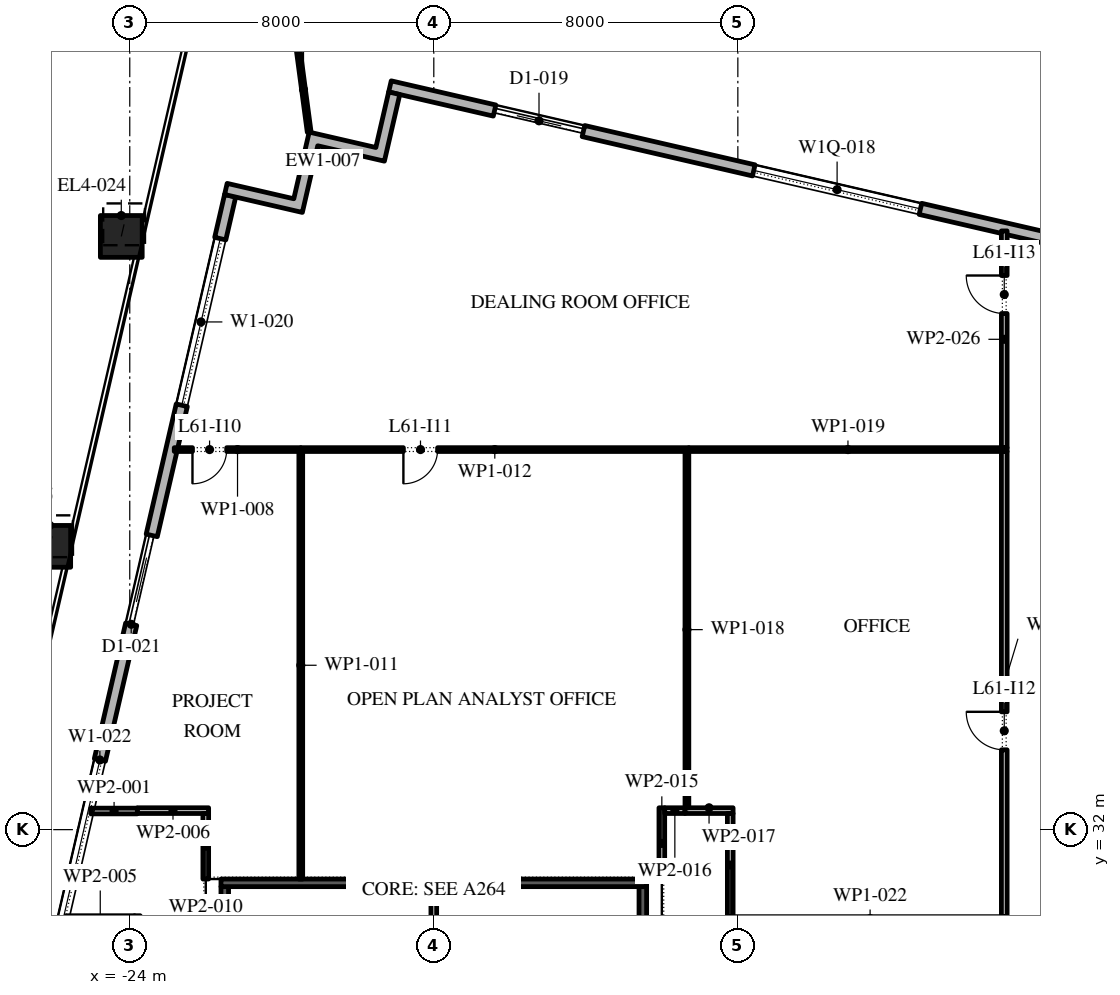
"""IFC4 building model, lengths in metres.
Left out: names, types, materials, properties, quantities, classifications, styles, units other than length and angle.
Written with IfcOpenShell. Run it as: python <this file> out.ifc"""

import sys

from ifc_helpers import new_model, si_unit, direction, frame, frame_2d, origin, origin_2d, place, context, subcontext, project, spatial, polyline, rectangle, outline, extrude, element, fill, save


model = new_model("IFC4")
c1 = context("Model", 3, precision=1e-05, world=origin(), true_north=direction((0.0, 1.0)))
c2 = subcontext(c1, "Body", "Model", "MODEL_VIEW")
j1 = project(units=[si_unit("LENGTHUNIT", "METRE"), si_unit("PLANEANGLEUNIT", "RADIAN")], contexts=[c1])
p1 = place(None, origin())
s1 = spatial("IfcSite", under=j1, at=p1, CompositionType="ELEMENT")
p2 = place(p1, origin())
s2 = spatial("IfcBuilding", under=s1, at=p2, CompositionType="ELEMENT")
p3 = place(p2, frame((0.0, 0.0, 280.8)))
s3 = spatial("IfcBuildingStorey", under=s2, at=p3, CompositionType="ELEMENT", Elevation=280.8)
p4 = place(p3, frame((-24.223, 47.608, 0.0), z_axis=(0.01744401301, 0.075745265796, 0.996974604049), x_axis=(-0.974491627871, 0.224423856151, 0.0)))
e1 = element("IfcColumn", 1, at=p4, inside=s3, PredefinedType="COLUMN", context=c2, shape_type="SweptSolid", body=[
    extrude(rectangle(XDim=1.1, YDim=1.1, at=origin_2d()), origin(), (0.0, 0.0, 1.0), 4.213),
])
p5 = place(p3, frame((-26.105, 39.454, 0.0), z_axis=(0.014559788571, 0.063169759976, 0.997896584813), x_axis=(-0.97445148511, 0.224598092528, 0.0)))
e2 = element("IfcColumn", 2, at=p5, inside=s3, PredefinedType="COLUMN", context=c2, shape_type="SweptSolid", body=[
    extrude(rectangle(XDim=1.1, YDim=1.1, at=origin_2d()), origin(), (0.0, 0.0, 1.0), 4.209),
])
p6 = place(p3, frame((29.616, 40.758, 0.0), z_axis=(0.0, 0.0, 1.0), x_axis=(-0.974370532314, 0.224949029246, 0.0)))
e3 = element("IfcWall", 3, at=p6, inside=s3, PredefinedType="STANDARD", context=c2, shape_type="SweptSolid", body=[
    extrude(rectangle(XDim=48.0, YDim=0.3, at=frame_2d((24.0, 0.0))), origin(), (0.0, 0.0, 1.0), 4.0),
])
p7 = place(p6, frame((1.625, 0.0, 0.45)))
e4 = element("IfcOpeningElement", 4, at=p7, cuts=e3, PredefinedType="OPENING", context=c2, shape_type="SweptSolid", body=[
    extrude(rectangle(XDim=4.5, YDim=2.575, at=frame_2d((2.25, 1.288))), frame((0.0, 0.16, 0.0), z_axis=(0.0, -1.0, 0.0), x_axis=(1.0, 0.0, 0.0)), (0.0, 0.0, 1.0), 0.32),
])
p8 = place(p6, frame((10.575, 0.0, 0.0)))
e5 = element("IfcOpeningElement", 5, at=p8, cuts=e3, PredefinedType="OPENING", context=c2, shape_type="SweptSolid", body=[
    extrude(rectangle(XDim=2.4, YDim=3.5, at=frame_2d((1.2, 1.75))), frame((0.0, 0.16, 0.0), z_axis=(0.0, -1.0, 0.0), x_axis=(1.0, 0.0, 0.0)), (0.0, 0.0, 1.0), 0.32),
])
p9 = place(p6, frame((17.575, 0.0, 0.45)))
e6 = element("IfcOpeningElement", 6, at=p9, cuts=e3, PredefinedType="OPENING", context=c2, shape_type="SweptSolid", body=[
    extrude(rectangle(XDim=4.5, YDim=2.45, at=frame_2d((2.25, 1.225))), frame((0.0, 0.16, 0.0), z_axis=(0.0, -1.0, 0.0), x_axis=(1.0, 0.0, 0.0)), (0.0, 0.0, 1.0), 0.32),
])
p10 = place(p6, frame((25.625, 0.0, 0.45)))
e7 = element("IfcOpeningElement", 7, at=p10, cuts=e3, PredefinedType="OPENING", context=c2, shape_type="SweptSolid", body=[
    extrude(rectangle(XDim=4.5, YDim=2.45, at=frame_2d((2.25, 1.225))), frame((0.0, 0.16, 0.0), z_axis=(0.0, -1.0, 0.0), x_axis=(1.0, 0.0, 0.0)), (0.0, 0.0, 1.0), 0.32),
])
p11 = place(p6, frame((33.675, 0.0, 0.45)))
e8 = element("IfcOpeningElement", 8, at=p11, cuts=e3, PredefinedType="OPENING", context=c2, shape_type="SweptSolid", body=[
    extrude(rectangle(XDim=4.5, YDim=2.45, at=frame_2d((2.25, 1.225))), frame((0.0, 0.16, 0.0), z_axis=(0.0, -1.0, 0.0), x_axis=(1.0, 0.0, 0.0)), (0.0, 0.0, 1.0), 0.32),
])
p12 = place(p6, frame((42.775, 0.0, 0.0)))
e9 = element("IfcOpeningElement", 9, at=p12, cuts=e3, PredefinedType="OPENING", context=c2, shape_type="SweptSolid", body=[
    extrude(rectangle(XDim=2.4, YDim=3.5, at=frame_2d((1.2, 1.75))), frame((0.0, 0.16, 0.0), z_axis=(0.0, -1.0, 0.0), x_axis=(1.0, 0.0, 0.0)), (0.0, 0.0, 1.0), 0.32),
])
p13 = place(p3, frame((-21.359, 48.678, 0.0), z_axis=(0.0, 0.0, 1.0), x_axis=(-0.224949198343, -0.974370493275, 0.0)))
e10 = element("IfcWall", 10, at=p13, inside=s3, PredefinedType="STANDARD", context=c2, shape_type="SweptSolid", body=[
    extrude(rectangle(XDim=49.5, YDim=0.3, at=frame_2d((24.75, 0.0))), origin(), (0.0, 0.0, 1.0), 4.0),
])
p14 = place(p13, frame((1.157, 0.0, 0.45)))
e11 = element("IfcOpeningElement", 11, at=p14, cuts=e10, PredefinedType="OPENING", context=c2, shape_type="SweptSolid", body=[
    extrude(rectangle(XDim=4.5, YDim=3.05, at=frame_2d((2.25, 1.525))), frame((0.0, 0.16, 0.0), z_axis=(0.0, -1.0, 0.0), x_axis=(1.0, 0.0, 0.0)), (0.0, 0.0, 1.0), 0.32),
])
p15 = place(p13, frame((9.171, 0.0, 0.0)))
e12 = element("IfcOpeningElement", 12, at=p15, cuts=e10, PredefinedType="OPENING", context=c2, shape_type="SweptSolid", body=[
    extrude(rectangle(XDim=2.4, YDim=3.5, at=frame_2d((1.2, 1.75))), frame((0.0, 0.16, 0.0), z_axis=(0.0, -1.0, 0.0), x_axis=(1.0, 0.0, 0.0)), (0.0, 0.0, 1.0), 0.32),
])
p16 = place(p13, frame((15.236, 0.0, 0.45)))
e13 = element("IfcOpeningElement", 13, at=p16, cuts=e10, PredefinedType="OPENING", context=c2, shape_type="SweptSolid", body=[
    extrude(rectangle(XDim=4.5, YDim=3.05, at=frame_2d((2.25, 1.525))), frame((0.0, 0.16, 0.0), z_axis=(0.0, -1.0, 0.0), x_axis=(1.0, 0.0, 0.0)), (0.0, 0.0, 1.0), 0.32),
])
p17 = place(p13, frame((22.35, 0.0, 0.45)))
e14 = element("IfcOpeningElement", 14, at=p17, cuts=e10, PredefinedType="OPENING", context=c2, shape_type="SweptSolid", body=[
    extrude(rectangle(XDim=4.5, YDim=3.05, at=frame_2d((2.25, 1.525))), frame((0.0, 0.16, 0.0), z_axis=(0.0, -1.0, 0.0), x_axis=(1.0, 0.0, 0.0)), (0.0, 0.0, 1.0), 0.32),
])
p18 = place(p13, frame((29.464, 0.0, 0.45)))
e15 = element("IfcOpeningElement", 15, at=p18, cuts=e10, PredefinedType="OPENING", context=c2, shape_type="SweptSolid", body=[
    extrude(rectangle(XDim=4.5, YDim=3.05, at=frame_2d((2.25, 1.525))), frame((0.0, 0.16, 0.0), z_axis=(0.0, -1.0, 0.0), x_axis=(1.0, 0.0, 0.0)), (0.0, 0.0, 1.0), 0.32),
])
p19 = place(p13, frame((37.628, 0.0, 0.0)))
e16 = element("IfcOpeningElement", 16, at=p19, cuts=e10, PredefinedType="OPENING", context=c2, shape_type="SweptSolid", body=[
    extrude(rectangle(XDim=2.4, YDim=3.325, at=frame_2d((1.2, 1.663))), frame((0.0, 0.16, 0.0), z_axis=(0.0, -1.0, 0.0), x_axis=(1.0, 0.0, 0.0)), (0.0, 0.0, 1.0), 0.32),
])
p20 = place(p13, frame((43.693, 0.0, 0.45)))
e17 = element("IfcOpeningElement", 17, at=p20, cuts=e10, PredefinedType="OPENING", context=c2, shape_type="SweptSolid", body=[
    extrude(rectangle(XDim=4.5, YDim=2.825, at=frame_2d((2.25, 1.413))), frame((0.0, 0.16, 0.0), z_axis=(0.0, -1.0, 0.0), x_axis=(1.0, 0.0, 0.0)), (0.0, 0.0, 1.0), 0.32),
])
p21 = place(p3, origin())
e18 = element("IfcWall", 18, at=p21, inside=s3, PredefinedType="STANDARD", context=c2, shape_type="SweptSolid", body=[
    extrude(outline(polyline([(-21.505, 48.712), (-21.438, 49.004), (-19.684, 48.599), (-19.279, 50.353), (-17.525, 49.948), (-17.188, 51.41), (-16.895, 51.342), (-17.3, 49.588), (-19.054, 49.993), (-19.459, 48.24), (-21.505, 48.712)])), origin(), (0.0, 0.0, 1.0), 4.0),
])
p22 = place(p3, frame((-19.279, 50.353, -0.05), z_axis=(0.0, 0.0, 1.0), x_axis=(-0.132368977056, 0.991200511457, 0.0)))
e19 = element("IfcWall", 19, at=p22, inside=s3, PredefinedType="STANDARD", context=c2, shape_type="SweptSolid", body=[
    extrude(rectangle(XDim=2.259, YDim=0.1, at=frame_2d((1.13, 0.0))), origin(), (0.0, 0.0, 1.0), 4.05),
])
p23 = place(p3, frame((-21.5, 25.75, 0.0), z_axis=(0.0, 0.0, 1.0), x_axis=(0.0, 1.0, 0.0)))
e20 = element("IfcWall", 20, at=p23, inside=s3, PredefinedType="SHEAR", context=c2, shape_type="SweptSolid", body=[
    extrude(rectangle(XDim=4.75, YDim=0.2, at=frame_2d((2.375, 0.0))), origin(), (0.0, 0.0, 1.0), 4.0),
])
p24 = place(p23, frame((1.925, 0.0, 0.0)))
e21 = element("IfcOpeningElement", 21, at=p24, cuts=e20, PredefinedType="OPENING", context=c2, shape_type="SweptSolid", body=[
    extrude(rectangle(XDim=0.9, YDim=2.1, at=frame_2d((0.45, 1.05))), frame((0.0, 0.11, 0.0), z_axis=(0.0, -1.0, 0.0), x_axis=(1.0, 0.0, 0.0)), (0.0, 0.0, 1.0), 0.22),
])
p25 = place(p3, frame((-10.5, 25.75, 0.0), z_axis=(0.0, 0.0, 1.0), x_axis=(0.0, 1.0, 0.0)))
e22 = element("IfcWall", 22, at=p25, inside=s3, PredefinedType="SHEAR", context=c2, shape_type="SweptSolid", body=[
    extrude(rectangle(XDim=4.75, YDim=0.2, at=frame_2d((2.375, 0.0))), origin(), (0.0, 0.0, 1.0), 4.0),
])
p26 = place(p25, frame((1.925, 0.0, 0.0)))
e23 = element("IfcOpeningElement", 23, at=p26, cuts=e22, PredefinedType="OPENING", context=c2, shape_type="SweptSolid", body=[
    extrude(rectangle(XDim=0.9, YDim=2.1, at=frame_2d((0.45, 1.05))), frame((0.0, 0.11, 0.0), z_axis=(0.0, -1.0, 0.0), x_axis=(1.0, 0.0, 0.0)), (0.0, 0.0, 1.0), 0.22),
])
p27 = place(p3, frame((-21.6, 30.6, 0.0), z_axis=(0.0, 0.0, 1.0), x_axis=(1.0, 0.0, 0.0)))
e24 = element("IfcWall", 24, at=p27, inside=s3, PredefinedType="SHEAR", context=c2, shape_type="SweptSolid", body=[
    extrude(rectangle(XDim=11.2, YDim=0.2, at=frame_2d((5.6, 0.0))), origin(), (0.0, 0.0, 1.0), 4.0),
])
p28 = place(p3, frame((-16.0, 25.75, 0.0), z_axis=(0.0, 0.0, 1.0), x_axis=(0.0, 1.0, 0.0)))
e25 = element("IfcWall", 25, at=p28, inside=s3, PredefinedType="PARTITIONING", context=c2, shape_type="SweptSolid", body=[
    extrude(rectangle(XDim=4.75, YDim=0.15, at=frame_2d((2.375, 0.0))), origin(), (0.0, 0.0, 1.0), 4.0),
])
p29 = place(p3, frame((-25.025, 32.49, 0.0), z_axis=(0.0, 0.0, 1.0), x_axis=(1.0, 0.0, 0.0)))
e26 = element("IfcWall", 26, at=p29, inside=s3, PredefinedType="PARTITIONING", context=c2, shape_type="SweptSolid", body=[
    extrude(rectangle(XDim=1.225, YDim=0.15, at=frame_2d((0.612, 0.0))), origin(), (0.0, 0.0, 1.0), 4.0),
])
p30 = place(p3, frame((-23.8, 32.5, 0.0), z_axis=(0.0, 0.0, 1.0), x_axis=(1.0, 0.0, 0.0)))
e27 = element("IfcWall", 27, at=p30, inside=s3, PredefinedType="PARTITIONING", context=c2, shape_type="SweptSolid", body=[
    extrude(rectangle(XDim=1.875, YDim=0.15, at=frame_2d((0.938, 0.0))), origin(), (0.0, 0.0, 1.0), 4.0),
])
p31 = place(p3, frame((-22.829, 42.0, 0.0), z_axis=(0.0, 0.0, 1.0), x_axis=(1.0, 0.0, 0.0)))
e28 = element("IfcWall", 28, at=p31, inside=s3, PredefinedType="PARTITIONING", context=c2, shape_type="SweptSolid", body=[
    extrude(rectangle(XDim=3.329, YDim=0.1, at=frame_2d((1.665, 0.0))), origin(), (0.0, 0.0, 1.0), 4.0),
])
p32 = place(p31, frame((0.479, 0.0, 0.0)))
e29 = element("IfcOpeningElement", 29, at=p32, cuts=e28, PredefinedType="OPENING", context=c2, shape_type="SweptSolid", body=[
    extrude(rectangle(XDim=0.9, YDim=2.1, at=frame_2d((0.45, 1.05))), frame((0.0, 0.06, 0.0), z_axis=(0.0, -1.0, 0.0), x_axis=(1.0, 0.0, 0.0)), (0.0, 0.0, 1.0), 0.12),
])
p33 = place(p3, frame((-22.0, 32.425, 0.0), z_axis=(0.0, 0.0, 1.0), x_axis=(0.0, -1.0, 0.0)))
e30 = element("IfcWall", 30, at=p33, inside=s3, PredefinedType="PARTITIONING", context=c2, shape_type="SweptSolid", body=[
    extrude(rectangle(XDim=1.725, YDim=0.15, at=frame_2d((0.863, 0.0))), origin(), (0.0, 0.0, 1.0), 4.0),
])
p34 = place(p3, frame((-19.5, 41.95, 0.0), z_axis=(0.0, 0.0, 1.0), x_axis=(0.0, -1.0, 0.0)))
e31 = element("IfcWall", 31, at=p34, inside=s3, PredefinedType="PARTITIONING", context=c2, shape_type="SweptSolid", body=[
    extrude(rectangle(XDim=11.25, YDim=0.1, at=frame_2d((5.625, 0.0))), origin(), (0.0, 0.0, 1.0), 4.0),
])
p35 = place(p3, frame((-19.5, 42.0, 0.0), z_axis=(0.0, 0.0, 1.0), x_axis=(1.0, 0.0, 0.0)))
e32 = element("IfcWall", 32, at=p35, inside=s3, PredefinedType="PARTITIONING", context=c2, shape_type="SweptSolid", body=[
    extrude(rectangle(XDim=10.21, YDim=0.1, at=frame_2d((5.105, 0.0))), origin(), (0.0, 0.0, 1.0), 4.0),
])
p36 = place(p35, frame((2.7, 0.0, 0.0)))
e33 = element("IfcOpeningElement", 33, at=p36, cuts=e32, PredefinedType="OPENING", context=c2, shape_type="SweptSolid", body=[
    extrude(rectangle(XDim=0.9, YDim=2.1, at=frame_2d((0.45, 1.05))), frame((0.0, 0.06, 0.0), z_axis=(0.0, -1.0, 0.0), x_axis=(1.0, 0.0, 0.0)), (0.0, 0.0, 1.0), 0.12),
])
p37 = place(p3, frame((-10.0, 30.7, 0.0), z_axis=(0.0, 0.0, 1.0), x_axis=(0.0, 1.0, 0.0)))
e34 = element("IfcWall", 34, at=p37, inside=s3, PredefinedType="PARTITIONING", context=c2, shape_type="SweptSolid", body=[
    extrude(rectangle(XDim=1.875, YDim=0.15, at=frame_2d((0.938, 0.0))), origin(), (0.0, 0.0, 1.0), 4.0),
])
p38 = place(p3, frame((-9.925, 32.5, 0.0), z_axis=(0.0, 0.0, 1.0), x_axis=(1.0, 0.0, 0.0)))
e35 = element("IfcWall", 35, at=p38, inside=s3, PredefinedType="PARTITIONING", context=c2, shape_type="SweptSolid", body=[
    extrude(rectangle(XDim=0.535, YDim=0.15, at=frame_2d((0.268, 0.0))), origin(), (0.0, 0.0, 1.0), 4.0),
])
p39 = place(p3, frame((-9.39, 32.5, 0.0), z_axis=(0.0, 0.0, 1.0), x_axis=(1.0, 0.0, 0.0)))
e36 = element("IfcWall", 36, at=p39, inside=s3, PredefinedType="PARTITIONING", context=c2, shape_type="SweptSolid", body=[
    extrude(rectangle(XDim=1.265, YDim=0.15, at=frame_2d((0.632, 0.0))), origin(), (0.0, 0.0, 1.0), 4.0),
])
p40 = place(p3, frame((-9.34, 41.95, 0.0), z_axis=(0.0, 0.0, 1.0), x_axis=(0.0, -1.0, 0.0)))
e37 = element("IfcWall", 37, at=p40, inside=s3, PredefinedType="PARTITIONING", context=c2, shape_type="SweptSolid", body=[
    extrude(rectangle(XDim=9.375, YDim=0.1, at=frame_2d((4.688, 0.0))), origin(), (0.0, 0.0, 1.0), 4.0),
])
p41 = place(p3, frame((-9.29, 42.0, 0.0), z_axis=(0.0, 0.0, 1.0), x_axis=(1.0, 0.0, 0.0)))
e38 = element("IfcWall", 38, at=p41, inside=s3, PredefinedType="PARTITIONING", context=c2, shape_type="SweptSolid", body=[
    extrude(rectangle(XDim=8.375, YDim=0.1, at=frame_2d((4.188, 0.0))), origin(), (0.0, 0.0, 1.0), 4.0),
])
p42 = place(p3, frame((-8.2, 32.425, 0.0), z_axis=(0.0, 0.0, 1.0), x_axis=(0.0, -1.0, 0.0)))
e39 = element("IfcWall", 39, at=p42, inside=s3, PredefinedType="PARTITIONING", context=c2, shape_type="SweptSolid", body=[
    extrude(rectangle(XDim=2.715, YDim=0.15, at=frame_2d((1.357, 0.0))), origin(), (0.0, 0.0, 1.0), 4.0),
])
p43 = place(p3, frame((-0.99, 29.71, 0.0), z_axis=(0.0, 0.0, 1.0), x_axis=(0.0, 1.0, 0.0)))
e40 = element("IfcWall", 40, at=p43, inside=s3, PredefinedType="PARTITIONING", context=c2, shape_type="SweptSolid", body=[
    extrude(rectangle(XDim=12.24, YDim=0.15, at=frame_2d((6.12, 0.0))), origin(), (0.0, 0.0, 1.0), 4.0),
])
p44 = place(p43, frame((4.39, 0.0, 0.0)))
e41 = element("IfcOpeningElement", 41, at=p44, cuts=e40, PredefinedType="OPENING", context=c2, shape_type="SweptSolid", body=[
    extrude(rectangle(XDim=1.0, YDim=2.1, at=frame_2d((0.5, 1.05))), frame((0.0, 0.085, 0.0), z_axis=(0.0, -1.0, 0.0), x_axis=(1.0, 0.0, 0.0)), (0.0, 0.0, 1.0), 0.17),
])
p45 = place(p3, frame((-0.99, 42.05, 0.0), z_axis=(0.0, 0.0, 1.0), x_axis=(0.0, 1.0, 0.0)))
e42 = element("IfcWall", 42, at=p45, inside=s3, PredefinedType="PARTITIONING", context=c2, shape_type="SweptSolid", body=[
    extrude(rectangle(XDim=5.703, YDim=0.15, at=frame_2d((2.852, 0.0))), origin(), (0.0, 0.0, 1.0), 4.0),
])
p46 = place(p45, frame((3.53, 0.0, 0.0)))
e43 = element("IfcOpeningElement", 43, at=p46, cuts=e42, PredefinedType="OPENING", context=c2, shape_type="SweptSolid", body=[
    extrude(rectangle(XDim=1.0, YDim=2.1, at=frame_2d((0.5, 1.05))), frame((0.0, 0.085, 0.0), z_axis=(0.0, -1.0, 0.0), x_axis=(1.0, 0.0, 0.0)), (0.0, 0.0, 1.0), 0.17),
])
p47 = place(p11, origin())
e44 = element("IfcWindow", 44, at=p47, inside=s3, PartitioningType="DOUBLE_PANEL_VERTICAL", PredefinedType="WINDOW", context=c2, shape_type="SweptSolid", body=[
    extrude(rectangle(XDim=4.5, YDim=2.45, at=frame_2d((2.25, 1.225))), frame((0.0, 0.03, 0.0), z_axis=(0.0, -1.0, 0.0), x_axis=(1.0, 0.0, 0.0)), (0.0, 0.0, 1.0), 0.06),
])
fill(e8, e44)
p48 = place(p12, origin())
e45 = element("IfcDoor", 45, at=p48, inside=s3, OperationType="DOUBLE_DOOR_SLIDING", PredefinedType="DOOR", context=c2, shape_type="SweptSolid", body=[
    extrude(rectangle(XDim=2.4, YDim=3.5, at=frame_2d((1.2, 1.75))), frame((0.0, 0.025, 0.0), z_axis=(0.0, -1.0, 0.0), x_axis=(1.0, 0.0, 0.0)), (0.0, 0.0, 1.0), 0.05),
])
fill(e9, e45)
p49 = place(p14, origin())
e46 = element("IfcWindow", 46, at=p49, inside=s3, PartitioningType="DOUBLE_PANEL_VERTICAL", PredefinedType="WINDOW", context=c2, shape_type="SweptSolid", body=[
    extrude(rectangle(XDim=4.5, YDim=3.05, at=frame_2d((2.25, 1.525))), frame((0.0, 0.03, 0.0), z_axis=(0.0, -1.0, 0.0), x_axis=(1.0, 0.0, 0.0)), (0.0, 0.0, 1.0), 0.06),
])
fill(e11, e46)
p50 = place(p15, origin())
e47 = element("IfcDoor", 47, at=p50, inside=s3, OperationType="DOUBLE_DOOR_SLIDING", PredefinedType="DOOR", context=c2, shape_type="SweptSolid", body=[
    extrude(rectangle(XDim=2.4, YDim=3.5, at=frame_2d((1.2, 1.75))), frame((0.0, 0.025, 0.0), z_axis=(0.0, -1.0, 0.0), x_axis=(1.0, 0.0, 0.0)), (0.0, 0.0, 1.0), 0.05),
])
fill(e12, e47)
p51 = place(p16, origin())
e48 = element("IfcWindow", 48, at=p51, inside=s3, PartitioningType="DOUBLE_PANEL_VERTICAL", PredefinedType="WINDOW", context=c2, shape_type="SweptSolid", body=[
    extrude(rectangle(XDim=4.5, YDim=3.05, at=frame_2d((2.25, 1.525))), frame((0.0, 0.03, 0.0), z_axis=(0.0, -1.0, 0.0), x_axis=(1.0, 0.0, 0.0)), (0.0, 0.0, 1.0), 0.06),
])
fill(e13, e48)
p52 = place(p32, frame((0.9, 0.0, 0.0), z_axis=(0.0, 0.0, 1.0), x_axis=(-1.0, 0.0, 0.0)))
e49 = element("IfcDoor", 49, at=p52, inside=s3, OperationType="SINGLE_SWING_LEFT", PredefinedType="DOOR", context=c2, shape_type="SweptSolid", body=[
    extrude(rectangle(XDim=0.9, YDim=2.1, at=frame_2d((0.45, 1.05))), frame((0.0, 0.025, 0.0), z_axis=(0.0, -1.0, 0.0), x_axis=(1.0, 0.0, 0.0)), (0.0, 0.0, 1.0), 0.05),
])
fill(e29, e49)
p53 = place(p36, frame((0.9, 0.0, 0.0), z_axis=(0.0, 0.0, 1.0), x_axis=(-1.0, 0.0, 0.0)))
e50 = element("IfcDoor", 50, at=p53, inside=s3, OperationType="SINGLE_SWING_LEFT", PredefinedType="DOOR", context=c2, shape_type="SweptSolid", body=[
    extrude(rectangle(XDim=0.9, YDim=2.1, at=frame_2d((0.45, 1.05))), frame((0.0, 0.025, 0.0), z_axis=(0.0, -1.0, 0.0), x_axis=(1.0, 0.0, 0.0)), (0.0, 0.0, 1.0), 0.05),
])
fill(e33, e50)
p54 = place(p44, origin())
e51 = element("IfcDoor", 51, at=p54, inside=s3, OperationType="SINGLE_SWING_LEFT", PredefinedType="DOOR", context=c2, shape_type="SweptSolid", body=[
    extrude(rectangle(XDim=1.0, YDim=2.1, at=frame_2d((0.5, 1.05))), frame((0.0, 0.025, 0.0), z_axis=(0.0, -1.0, 0.0), x_axis=(1.0, 0.0, 0.0)), (0.0, 0.0, 1.0), 0.05),
])
fill(e41, e51)
p55 = place(p46, origin())
e52 = element("IfcDoor", 52, at=p55, inside=s3, OperationType="SINGLE_SWING_LEFT", PredefinedType="DOOR", context=c2, shape_type="SweptSolid", body=[
    extrude(rectangle(XDim=1.0, YDim=2.1, at=frame_2d((0.5, 1.05))), frame((0.0, 0.025, 0.0), z_axis=(0.0, -1.0, 0.0), x_axis=(1.0, 0.0, 0.0)), (0.0, 0.0, 1.0), 0.05),
])
fill(e43, e52)
save(model, sys.argv[1])
